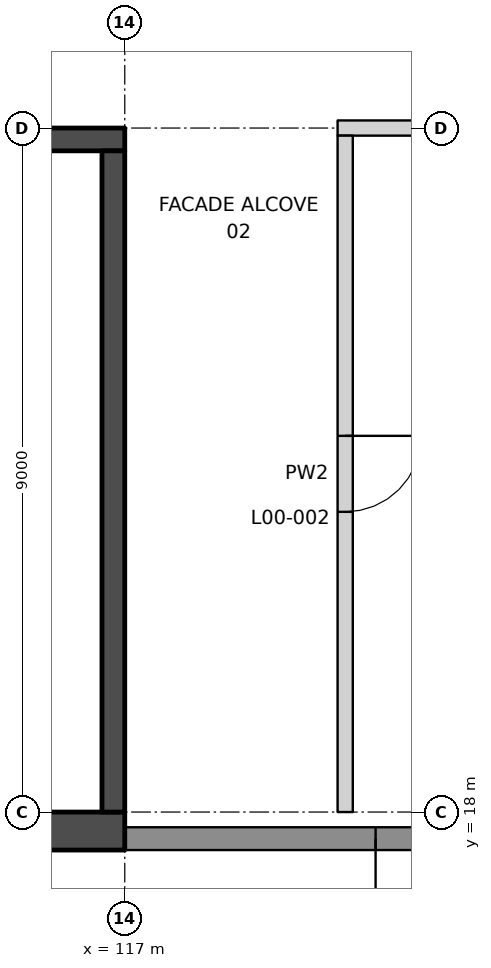
"""IFC4 building model, lengths in metres.
Left out: names, types, materials, properties, quantities, classifications, styles, units other than length and angle.
Written with IfcOpenShell. Run it as: python <this file> out.ifc"""

import sys

from ifc_helpers import new_model, si_unit, direction, frame, frame_2d, origin, place, context, subcontext, project, spatial, rectangle, extrude, element, fill, save


model = new_model("IFC4")
c1 = context("Model", 3, precision=1e-05, world=origin(), true_north=direction((0.0, 1.0)))
c2 = subcontext(c1, "Body", "Model", "MODEL_VIEW")
j1 = project(units=[si_unit("LENGTHUNIT", "METRE"), si_unit("PLANEANGLEUNIT", "RADIAN")], contexts=[c1])
p1 = place(None, origin())
s1 = spatial("IfcSite", under=j1, at=p1, CompositionType="ELEMENT")
p2 = place(p1, origin())
s2 = spatial("IfcBuilding", under=s1, at=p2, CompositionType="ELEMENT")
p3 = place(p2, origin())
s3 = spatial("IfcBuildingStorey", under=s2, at=p3, CompositionType="ELEMENT", Elevation=0.0)
p4 = place(p3, frame((119.8, 27.0, 0.0), z_axis=(0.0, 0.0, 1.0), x_axis=(1.0, 0.0, 0.0)))
e1 = element("IfcWall", 1, at=p4, inside=s3, PredefinedType="PARTITIONING", context=c2, shape_type="SweptSolid", body=[
    extrude(rectangle(XDim=5.75, YDim=0.2, at=frame_2d((2.875, 0.0))), origin(), (0.0, 0.0, 1.0), 5.75),
])
p5 = place(p3, frame((119.9, 18.0, 0.0), z_axis=(0.0, 0.0, 1.0), x_axis=(0.0, 1.0, 0.0)))
e2 = element("IfcWall", 2, at=p5, inside=s3, PredefinedType="PARTITIONING", context=c2, shape_type="SweptSolid", body=[
    extrude(rectangle(XDim=8.9, YDim=0.2, at=frame_2d((4.45, 0.0))), origin(), (0.0, 0.0, 1.0), 7.0),
])
p6 = place(p5, frame((3.95, 0.0, 0.0)))
e3 = element("IfcOpeningElement", 3, at=p6, cuts=e2, PredefinedType="OPENING", context=c2, shape_type="SweptSolid", body=[
    extrude(rectangle(XDim=1.0, YDim=2.1, at=frame_2d((0.5, 1.05))), frame((0.0, 0.11, 0.0), z_axis=(0.0, -1.0, 0.0), x_axis=(1.0, 0.0, 0.0)), (0.0, 0.0, 1.0), 0.22),
])
p7 = place(p3, frame((117.0, 17.65, 0.0), z_axis=(0.0, 0.0, 1.0), x_axis=(1.0, 0.0, 0.0)))
e4 = element("IfcWall", 4, at=p7, inside=s3, PredefinedType="SOLIDWALL", context=c2, shape_type="SweptSolid", body=[
    extrude(rectangle(XDim=8.5, YDim=0.3, at=frame_2d((4.25, 0.0))), origin(), (0.0, 0.0, 1.0), 7.0),
])
p8 = place(p7, frame((3.3, 0.0, 0.0)))
e5 = element("IfcOpeningElement", 5, at=p8, cuts=e4, PredefinedType="OPENING", context=c2, shape_type="SweptSolid", body=[
    extrude(rectangle(XDim=2.4, YDim=2.4, at=frame_2d((1.2, 1.2))), frame((0.0, 0.16, 0.0), z_axis=(0.0, -1.0, 0.0), x_axis=(1.0, 0.0, 0.0)), (0.0, 0.0, 1.0), 0.32),
])
p9 = place(p3, frame((117.0, 26.85, 0.0), z_axis=(0.0, 0.0, 1.0), x_axis=(-1.0, 0.0, 0.0)))
e6 = element("IfcWall", 6, at=p9, inside=s3, PredefinedType="SHEAR", context=c2, shape_type="SweptSolid", body=[
    extrude(rectangle(XDim=18.0, YDim=0.3, at=frame_2d((9.0, 0.0))), origin(), (0.0, 0.0, 1.0), 7.0),
])
p10 = place(p9, frame((8.6, 0.0, 0.0)))
e7 = element("IfcOpeningElement", 7, at=p10, cuts=e6, PredefinedType="OPENING", context=c2, shape_type="SweptSolid", body=[
    extrude(rectangle(XDim=1.2, YDim=2.1, at=frame_2d((0.6, 1.05))), frame((0.0, 0.16, 0.0), z_axis=(0.0, -1.0, 0.0), x_axis=(1.0, 0.0, 0.0)), (0.0, 0.0, 1.0), 0.32),
])
p11 = place(p3, frame((117.0, 17.75, 0.0), z_axis=(0.0, 0.0, 1.0), x_axis=(-1.0, 0.0, 0.0)))
e8 = element("IfcWall", 8, at=p11, inside=s3, PredefinedType="SHEAR", context=c2, shape_type="SweptSolid", body=[
    extrude(rectangle(XDim=18.0, YDim=0.5, at=frame_2d((9.0, 0.0))), origin(), (0.0, 0.0, 1.0), 7.0),
])
p12 = place(p11, frame((7.9, 0.0, 0.0)))
e9 = element("IfcOpeningElement", 9, at=p12, cuts=e8, PredefinedType="OPENING", context=c2, shape_type="SweptSolid", body=[
    extrude(rectangle(XDim=2.6, YDim=2.4, at=frame_2d((1.3, 1.2))), frame((0.0, 0.26, 0.0), z_axis=(0.0, -1.0, 0.0), x_axis=(1.0, 0.0, 0.0)), (0.0, 0.0, 1.0), 0.52),
])
p13 = place(p3, frame((116.85, 26.7, 0.0), z_axis=(0.0, 0.0, 1.0), x_axis=(0.0, -1.0, 0.0)))
e10 = element("IfcWall", 10, at=p13, inside=s3, PredefinedType="SHEAR", context=c2, shape_type="SweptSolid", body=[
    extrude(rectangle(XDim=8.7, YDim=0.3, at=frame_2d((4.35, 0.0))), origin(), (0.0, 0.0, 1.0), 7.0),
])
p14 = place(p6, frame((1.0, 0.0, 0.0), z_axis=(0.0, 0.0, 1.0), x_axis=(-1.0, 0.0, 0.0)))
e11 = element("IfcDoor", 11, at=p14, inside=s3, OperationType="SINGLE_SWING_LEFT", PredefinedType="DOOR", context=c2, shape_type="SweptSolid", body=[
    extrude(rectangle(XDim=1.0, YDim=2.1, at=frame_2d((0.5, 1.05))), frame((0.0, 0.025, 0.0), z_axis=(0.0, -1.0, 0.0), x_axis=(1.0, 0.0, 0.0)), (0.0, 0.0, 1.0), 0.05),
])
fill(e3, e11)
p15 = place(p8, frame((2.4, 0.0, 0.0), z_axis=(0.0, 0.0, 1.0), x_axis=(-1.0, 0.0, 0.0)))
e12 = element("IfcDoor", 12, at=p15, inside=s3, OperationType="DOUBLE_DOOR_SINGLE_SWING", PredefinedType="DOOR", context=c2, shape_type="SweptSolid", body=[
    extrude(rectangle(XDim=2.4, YDim=2.4, at=frame_2d((1.2, 1.2))), frame((0.0, 0.025, 0.0), z_axis=(0.0, -1.0, 0.0), x_axis=(1.0, 0.0, 0.0)), (0.0, 0.0, 1.0), 0.05),
])
fill(e5, e12)
save(model, sys.argv[1])
